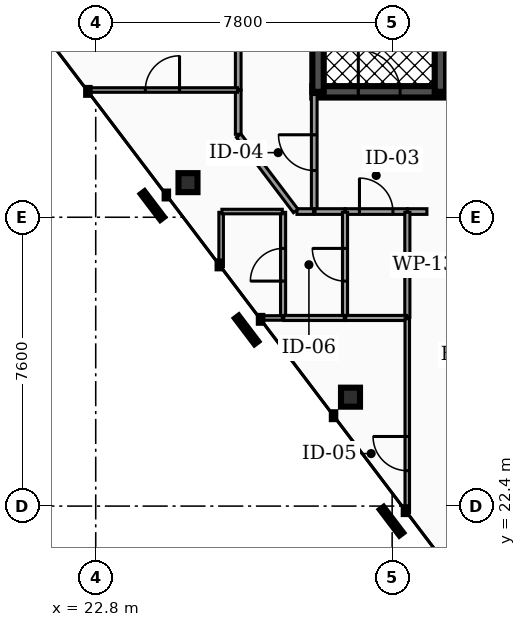
"""IFC4 building model, lengths in metres.
Left out: names, types, materials, properties, quantities, classifications, styles, units other than length and angle.
Written with IfcOpenShell. Run it as: python <this file> out.ifc"""

import sys

from ifc_helpers import new_model, si_unit, direction, frame, frame_2d, origin, origin_2d, place, context, subcontext, project, spatial, rectangle, hollow_rectangle, extrude, element, fill, save


model = new_model("IFC4")
c1 = context("Model", 3, precision=1e-05, world=origin(), true_north=direction((0.0, 1.0)))
c2 = subcontext(c1, "Body", "Model", "MODEL_VIEW")
j1 = project(units=[si_unit("LENGTHUNIT", "METRE"), si_unit("PLANEANGLEUNIT", "RADIAN")], contexts=[c1])
p1 = place(None, origin())
s1 = spatial("IfcSite", under=j1, at=p1, CompositionType="ELEMENT")
p2 = place(p1, origin())
s2 = spatial("IfcBuilding", under=s1, at=p2, CompositionType="ELEMENT")
p3 = place(p2, frame((0.0, 0.0, 261.8)))
s3 = spatial("IfcBuildingStorey", under=s2, at=p3, CompositionType="ELEMENT", Elevation=261.8)
p4 = place(p3, frame((28.5, 33.3, 0.0), z_axis=(0.0, 0.0, 1.0), x_axis=(1.0, 0.0, 0.0)))
e1 = element("IfcWall", 1, at=p4, inside=s3, PredefinedType="SHEAR", context=c2, shape_type="SweptSolid", body=[
    extrude(rectangle(XDim=19.86, YDim=0.3, at=frame_2d((9.93, 0.0))), origin(), (0.0, 0.0, 1.0), 3.18),
])
p5 = place(p4, frame((3.93, 0.0, 0.0)))
e2 = element("IfcOpeningElement", 2, at=p5, cuts=e1, PredefinedType="OPENING", context=c2, shape_type="SweptSolid", body=[
    extrude(rectangle(XDim=1.1, YDim=2.15, at=frame_2d((0.55, 1.075))), frame((0.0, 0.16, 0.0), z_axis=(0.0, -1.0, 0.0), x_axis=(1.0, 0.0, 0.0)), (0.0, 0.0, 1.0), 0.32),
])
p6 = place(p4, frame((14.77, 0.0, 0.0)))
e3 = element("IfcOpeningElement", 3, at=p6, cuts=e1, PredefinedType="OPENING", context=c2, shape_type="SweptSolid", body=[
    extrude(rectangle(XDim=1.1, YDim=2.15, at=frame_2d((0.55, 1.075))), frame((0.0, 0.16, 0.0), z_axis=(0.0, -1.0, 0.0), x_axis=(1.0, 0.0, 0.0)), (0.0, 0.0, 1.0), 0.32),
])
p7 = place(p4, frame((11.25, 0.0, 0.0)))
e4 = element("IfcOpeningElement", 4, at=p7, cuts=e1, PredefinedType="OPENING", context=c2, shape_type="SweptSolid", body=[
    extrude(rectangle(XDim=1.0, YDim=2.1, at=frame_2d((0.5, 1.05))), frame((0.0, 0.16, 0.0), z_axis=(0.0, -1.0, 0.0), x_axis=(1.0, 0.0, 0.0)), (0.0, 0.0, 1.0), 0.32),
])
p8 = place(p4, frame((12.95, 0.0, 0.0)))
e5 = element("IfcOpeningElement", 5, at=p8, cuts=e1, PredefinedType="OPENING", context=c2, shape_type="SweptSolid", body=[
    extrude(rectangle(XDim=1.0, YDim=2.1, at=frame_2d((0.5, 1.05))), frame((0.0, 0.16, 0.0), z_axis=(0.0, -1.0, 0.0), x_axis=(1.0, 0.0, 0.0)), (0.0, 0.0, 1.0), 0.32),
])
p9 = place(p4, frame((5.85, 0.0, 0.0)))
e6 = element("IfcOpeningElement", 6, at=p9, cuts=e1, PredefinedType="OPENING", context=c2, shape_type="SweptSolid", body=[
    extrude(rectangle(XDim=1.0, YDim=2.1, at=frame_2d((0.5, 1.05))), frame((0.0, 0.16, 0.0), z_axis=(0.0, -1.0, 0.0), x_axis=(1.0, 0.0, 0.0)), (0.0, 0.0, 1.0), 0.32),
])
p10 = place(p4, frame((1.21, 0.0, 0.0)))
e7 = element("IfcOpeningElement", 7, at=p10, cuts=e1, PredefinedType="OPENING", context=c2, shape_type="SweptSolid", body=[
    extrude(rectangle(XDim=1.1, YDim=2.2, at=frame_2d((0.55, 1.1))), frame((0.0, 0.16, 0.0), z_axis=(0.0, -1.0, 0.0), x_axis=(1.0, 0.0, 0.0)), (0.0, 0.0, 1.0), 0.32),
])
p11 = place(p4, frame((9.34, 0.0, 0.0)))
e8 = element("IfcOpeningElement", 8, at=p11, cuts=e1, PredefinedType="OPENING", context=c2, shape_type="SweptSolid", body=[
    extrude(rectangle(XDim=1.12, YDim=2.05, at=frame_2d((0.56, 1.025))), frame((0.0, 0.16, 0.0), z_axis=(0.0, -1.0, 0.0), x_axis=(1.0, 0.0, 0.0)), (0.0, 0.0, 1.0), 0.32),
])
p12 = place(p4, frame((17.55, 0.0, 0.0)))
e9 = element("IfcOpeningElement", 9, at=p12, cuts=e1, PredefinedType="OPENING", context=c2, shape_type="SweptSolid", body=[
    extrude(rectangle(XDim=1.1, YDim=2.2, at=frame_2d((0.55, 1.1))), frame((0.0, 0.16, 0.0), z_axis=(0.0, -1.0, 0.0), x_axis=(1.0, 0.0, 0.0)), (0.0, 0.0, 1.0), 0.32),
])
for number, where, z_axis, x_axis in (
    (10, (28.65, 33.3, 0.0), (0.0, 0.0, 1.0), (0.0, 1.0, 0.0)),
    (11, (31.87, 33.3, 0.0), (0.0, 0.0, 1.0), (0.0, 1.0, 0.0)),
):
    element("IfcWall", number, at=place(p3, frame(where, z_axis=z_axis, x_axis=x_axis)), inside=s3, PredefinedType="SHEAR", context=c2, shape_type="SweptSolid", body=[
        extrude(rectangle(XDim=10.1, YDim=0.3, at=frame_2d((5.05, 0.0))), origin(), (0.0, 0.0, 1.0), 3.18),
    ])
for number, where, z_axis, x_axis in (
    (12, (25.228, 30.91, 0.0), (0.0, 0.0, 1.0), (1.0, 0.0, 0.0)),
    (13, (29.504, 25.266, 0.0), (0.0, 0.0, 1.0), (1.0, 0.0, 0.0)),
):
    element("IfcColumn", number, at=place(p3, frame(where, z_axis=z_axis, x_axis=x_axis)), inside=s3, PredefinedType="COLUMN", context=c2, shape_type="SweptSolid", body=[
        extrude(hollow_rectangle(XDim=0.5, YDim=0.5, WallThickness=0.025, at=origin_2d()), origin(), (0.0, 0.0, 1.0), 3.18),
    ])
p13 = place(p3, frame((28.55, 30.17, 0.0), z_axis=(0.0, 0.0, 1.0), x_axis=(0.0, 1.0, 0.0)))
e14 = element("IfcWall", 14, at=p13, inside=s3, PredefinedType="PARTITIONING", context=c2, shape_type="SweptSolid", body=[
    extrude(rectangle(XDim=3.06, YDim=0.15, at=frame_2d((1.53, 0.0))), origin(), (0.0, 0.0, 1.0), 2.235),
])
p14 = place(p13, frame((1.06, 0.0, 0.0)))
e15 = element("IfcOpeningElement", 15, at=p14, cuts=e14, PredefinedType="OPENING", context=c2, shape_type="SweptSolid", body=[
    extrude(rectangle(XDim=0.94, YDim=2.05, at=frame_2d((0.47, 1.025))), frame((0.0, 0.085, 0.0), z_axis=(0.0, -1.0, 0.0), x_axis=(1.0, 0.0, 0.0)), (0.0, 0.0, 1.0), 0.17),
])
p15 = place(p3, frame((28.57, 30.15, 0.0), z_axis=(0.0, 0.0, 1.0), x_axis=(1.0, 0.0, 0.0)))
e16 = element("IfcWall", 16, at=p15, inside=s3, PredefinedType="PARTITIONING", context=c2, shape_type="SweptSolid", body=[
    extrude(rectangle(XDim=0.785, YDim=0.15, at=frame_2d((0.393, 0.0))), origin(), (0.0, 0.0, 1.0), 2.235),
])
p16 = place(p3, frame((29.365, 30.15, 0.0), z_axis=(0.0, 0.0, 1.0), x_axis=(1.0, 0.0, 0.0)))
e17 = element("IfcWall", 17, at=p16, inside=s3, PredefinedType="PARTITIONING", context=c2, shape_type="SweptSolid", body=[
    extrude(rectangle(XDim=1.63, YDim=0.15, at=frame_2d((0.815, 0.0))), origin(), (0.0, 0.0, 1.0), 2.235),
])
p17 = place(p16, frame((0.375, 0.0, 0.0)))
e18 = element("IfcOpeningElement", 18, at=p17, cuts=e17, PredefinedType="OPENING", context=c2, shape_type="SweptSolid", body=[
    extrude(rectangle(XDim=0.88, YDim=2.05, at=frame_2d((0.44, 1.025))), frame((0.0, 0.085, 0.0), z_axis=(0.0, -1.0, 0.0), x_axis=(1.0, 0.0, 0.0)), (0.0, 0.0, 1.0), 0.17),
])
p18 = place(p3, frame((31.005, 30.15, 0.0), z_axis=(0.0, 0.0, 1.0), x_axis=(1.0, 0.0, 0.0)))
e19 = element("IfcWall", 19, at=p18, inside=s3, PredefinedType="PARTITIONING", context=c2, shape_type="SweptSolid", body=[
    extrude(rectangle(XDim=0.51, YDim=0.15, at=frame_2d((0.255, 0.0))), origin(), (0.0, 0.0, 1.0), 2.235),
])
p19 = place(p3, frame((28.094, 30.15, 0.0), z_axis=(0.0, 0.0, 1.0), x_axis=(1.0, 0.0, 0.0)))
e20 = element("IfcWall", 20, at=p19, inside=s3, PredefinedType="PARTITIONING", context=c2, shape_type="SweptSolid", body=[
    extrude(rectangle(XDim=0.436, YDim=0.15, at=frame_2d((0.218, 0.0))), origin(), (0.0, 0.0, 1.0), 2.235),
])
p20 = place(p3, frame((26.55, 33.353, 0.0), z_axis=(0.0, 0.0, 1.0), x_axis=(0.0, 1.0, 0.0)))
e21 = element("IfcWall", 21, at=p20, inside=s3, PredefinedType="PARTITIONING", context=c2, shape_type="SweptSolid", body=[
    extrude(rectangle(XDim=10.197, YDim=0.15, at=frame_2d((5.099, 0.0))), origin(), (0.0, 0.0, 1.0), 2.235),
])
p21 = place(p20, frame((4.628, 0.0, 0.0)))
e22 = element("IfcOpeningElement", 22, at=p21, cuts=e21, PredefinedType="OPENING", context=c2, shape_type="SweptSolid", body=[
    extrude(rectangle(XDim=0.94, YDim=2.05, at=frame_2d((0.47, 1.025))), frame((0.0, 0.085, 0.0), z_axis=(0.0, -1.0, 0.0), x_axis=(1.0, 0.0, 0.0)), (0.0, 0.0, 1.0), 0.17),
])
p22 = place(p3, frame((26.562, 32.146, 0.0), z_axis=(0.0, 0.0, 1.0), x_axis=(0.603891739408, -0.797066350485, 0.0)))
e23 = element("IfcWall", 23, at=p22, inside=s3, PredefinedType="PARTITIONING", context=c2, shape_type="SweptSolid", body=[
    extrude(rectangle(XDim=2.485, YDim=0.15, at=frame_2d((1.242, 0.0))), origin(), (0.0, 0.0, 1.0), 2.235),
])
p23 = place(p3, frame((26.55, 32.183, 0.0), z_axis=(0.0, 0.0, 1.0), x_axis=(0.0, 1.0, 0.0)))
e24 = element("IfcWall", 24, at=p23, inside=s3, PredefinedType="PARTITIONING", context=c2, shape_type="SweptSolid", body=[
    extrude(rectangle(XDim=1.16, YDim=0.15, at=frame_2d((0.58, 0.0))), origin(), (0.0, 0.0, 1.0), 2.235),
])
p24 = place(p3, frame((29.36, 27.37, 0.0), z_axis=(0.0, 0.0, 1.0), x_axis=(0.0, 1.0, 0.0)))
e25 = element("IfcWall", 25, at=p24, inside=s3, PredefinedType="PARTITIONING", context=c2, shape_type="SweptSolid", body=[
    extrude(rectangle(XDim=2.76, YDim=0.135, at=frame_2d((1.38, 0.0))), origin(), (0.0, 0.0, 1.0), 2.235),
])
p25 = place(p24, frame((0.95, 0.0, 0.0)))
e26 = element("IfcOpeningElement", 26, at=p25, cuts=e25, PredefinedType="OPENING", context=c2, shape_type="SweptSolid", body=[
    extrude(rectangle(XDim=0.86, YDim=2.05, at=frame_2d((0.43, 1.025))), frame((0.0, 0.077, 0.0), z_axis=(0.0, -1.0, 0.0), x_axis=(1.0, 0.0, 0.0)), (0.0, 0.0, 1.0), 0.155),
])
p26 = place(p3, frame((27.73, 27.37, 0.0), z_axis=(0.0, 0.0, 1.0), x_axis=(0.0, 1.0, 0.0)))
e27 = element("IfcWall", 27, at=p26, inside=s3, PredefinedType="PARTITIONING", context=c2, shape_type="SweptSolid", body=[
    extrude(rectangle(XDim=2.76, YDim=0.135, at=frame_2d((1.38, 0.0))), origin(), (0.0, 0.0, 1.0), 2.235),
])
p27 = place(p26, frame((0.95, 0.0, 0.0)))
e28 = element("IfcOpeningElement", 28, at=p27, cuts=e27, PredefinedType="OPENING", context=c2, shape_type="SweptSolid", body=[
    extrude(rectangle(XDim=0.86, YDim=2.05, at=frame_2d((0.43, 1.025))), frame((0.0, 0.077, 0.0), z_axis=(0.0, -1.0, 0.0), x_axis=(1.0, 0.0, 0.0)), (0.0, 0.0, 1.0), 0.155),
])
p28 = place(p3, frame((27.75, 27.35, 0.0), z_axis=(0.0, 0.0, 1.0), x_axis=(1.0, 0.0, 0.0)))
e29 = element("IfcWall", 29, at=p28, inside=s3, PredefinedType="PARTITIONING", context=c2, shape_type="SweptSolid", body=[
    extrude(rectangle(XDim=1.59, YDim=0.135, at=frame_2d((0.795, 0.0))), origin(), (0.0, 0.0, 1.0), 2.235),
])
p29 = place(p3, frame((31.0, 27.37, 0.0), z_axis=(0.0, 0.0, 1.0), x_axis=(0.0, 1.0, 0.0)))
e30 = element("IfcWall", 30, at=p29, inside=s3, PredefinedType="PARTITIONING", context=c2, shape_type="SweptSolid", body=[
    extrude(rectangle(XDim=2.76, YDim=0.135, at=frame_2d((1.38, 0.0))), origin(), (0.0, 0.0, 1.0), 2.235),
])
p30 = place(p3, frame((29.38, 27.35, 0.0), z_axis=(0.0, 0.0, 1.0), x_axis=(1.0, 0.0, 0.0)))
e31 = element("IfcWall", 31, at=p30, inside=s3, PredefinedType="PARTITIONING", context=c2, shape_type="SweptSolid", body=[
    extrude(rectangle(XDim=1.6, YDim=0.135, at=frame_2d((0.8, 0.0))), origin(), (0.0, 0.0, 1.0), 2.235),
])
p31 = place(p3, frame((27.125, 27.35, 0.0), z_axis=(0.0, 0.0, 1.0), x_axis=(1.0, 0.0, 0.0)))
e32 = element("IfcWall", 32, at=p31, inside=s3, PredefinedType="PARTITIONING", context=c2, shape_type="SweptSolid", body=[
    extrude(rectangle(XDim=0.585, YDim=0.12, at=frame_2d((0.293, 0.0))), origin(), (0.0, 0.0, 1.0), 2.235),
])
p32 = place(p3, frame((26.1, 28.698, 0.0), z_axis=(0.0, 0.0, 1.0), x_axis=(0.0, 1.0, 0.0)))
e33 = element("IfcWall", 33, at=p32, inside=s3, PredefinedType="PARTITIONING", context=c2, shape_type="SweptSolid", body=[
    extrude(rectangle(XDim=1.432, YDim=0.12, at=frame_2d((0.716, 0.0))), origin(), (0.0, 0.0, 1.0), 2.235),
])
p33 = place(p3, frame((26.12, 30.15, 0.0), z_axis=(0.0, 0.0, 1.0), x_axis=(1.0, 0.0, 0.0)))
e34 = element("IfcWall", 34, at=p33, inside=s3, PredefinedType="PARTITIONING", context=c2, shape_type="SweptSolid", body=[
    extrude(rectangle(XDim=1.59, YDim=0.12, at=frame_2d((0.795, 0.0))), origin(), (0.0, 0.0, 1.0), 2.235),
])
p34 = place(p3, frame((30.998, 22.232, 0.0), z_axis=(0.0, 0.0, 1.0), x_axis=(0.0, 1.0, 0.0)))
e35 = element("IfcWall", 35, at=p34, inside=s3, PredefinedType="PARTITIONING", context=c2, shape_type="SweptSolid", body=[
    extrude(rectangle(XDim=5.098, YDim=0.12, at=frame_2d((2.549, 0.0))), origin(), (0.0, 0.0, 1.0), 2.235),
])
p35 = place(p34, frame((1.099, 0.0, 0.0)))
e36 = element("IfcOpeningElement", 36, at=p35, cuts=e35, PredefinedType="OPENING", context=c2, shape_type="SweptSolid", body=[
    extrude(rectangle(XDim=0.9, YDim=2.05, at=frame_2d((0.45, 1.025))), frame((0.0, 0.07, 0.0), z_axis=(0.0, -1.0, 0.0), x_axis=(1.0, 0.0, 0.0)), (0.0, 0.0, 1.0), 0.14),
])
p36 = place(p3, frame((22.581, 33.348, 0.0), z_axis=(0.0, 0.0, 1.0), x_axis=(1.0, 0.0, 0.0)))
e37 = element("IfcWall", 37, at=p36, inside=s3, PredefinedType="PARTITIONING", context=c2, shape_type="SweptSolid", body=[
    extrude(rectangle(XDim=3.949, YDim=0.12, at=frame_2d((1.975, 0.0))), origin(), (0.0, 0.0, 1.0), 2.235),
])
p37 = place(p36, frame((1.525, 0.0, 0.0)))
e38 = element("IfcOpeningElement", 38, at=p37, cuts=e37, PredefinedType="OPENING", context=c2, shape_type="SweptSolid", body=[
    extrude(rectangle(XDim=0.9, YDim=2.05, at=frame_2d((0.45, 1.025))), frame((0.0, 0.07, 0.0), z_axis=(0.0, -1.0, 0.0), x_axis=(1.0, 0.0, 0.0)), (0.0, 0.0, 1.0), 0.14),
])
p38 = place(p10, origin())
e39 = element("IfcDoor", 39, at=p38, inside=s3, OperationType="SINGLE_SWING_LEFT", PredefinedType="DOOR", context=c2, shape_type="SweptSolid", body=[
    extrude(rectangle(XDim=1.1, YDim=2.2, at=frame_2d((0.55, 1.1))), frame((0.0, 0.025, 0.0), z_axis=(0.0, -1.0, 0.0), x_axis=(1.0, 0.0, 0.0)), (0.0, 0.0, 1.0), 0.05),
])
fill(e7, e39)
p39 = place(p14, origin())
e40 = element("IfcDoor", 40, at=p39, inside=s3, OperationType="SINGLE_SWING_RIGHT", PredefinedType="DOOR", context=c2, shape_type="SweptSolid", body=[
    extrude(rectangle(XDim=0.94, YDim=2.05, at=frame_2d((0.47, 1.025))), frame((0.0, 0.025, 0.0), z_axis=(0.0, -1.0, 0.0), x_axis=(1.0, 0.0, 0.0)), (0.0, 0.0, 1.0), 0.05),
])
fill(e15, e40)
p40 = place(p17, origin())
e41 = element("IfcDoor", 41, at=p40, inside=s3, OperationType="SINGLE_SWING_LEFT", PredefinedType="DOOR", context=c2, shape_type="SweptSolid", body=[
    extrude(rectangle(XDim=0.88, YDim=2.05, at=frame_2d((0.44, 1.025))), frame((0.0, 0.025, 0.0), z_axis=(0.0, -1.0, 0.0), x_axis=(1.0, 0.0, 0.0)), (0.0, 0.0, 1.0), 0.05),
])
fill(e18, e41)
p41 = place(p25, origin())
e42 = element("IfcDoor", 42, at=p41, inside=s3, OperationType="SINGLE_SWING_RIGHT", PredefinedType="DOOR", context=c2, shape_type="SweptSolid", body=[
    extrude(rectangle(XDim=0.86, YDim=2.05, at=frame_2d((0.43, 1.025))), frame((0.0, 0.025, 0.0), z_axis=(0.0, -1.0, 0.0), x_axis=(1.0, 0.0, 0.0)), (0.0, 0.0, 1.0), 0.05),
])
fill(e26, e42)
p42 = place(p27, origin())
e43 = element("IfcDoor", 43, at=p42, inside=s3, OperationType="SINGLE_SWING_LEFT", PredefinedType="DOOR", context=c2, shape_type="SweptSolid", body=[
    extrude(rectangle(XDim=0.86, YDim=2.05, at=frame_2d((0.43, 1.025))), frame((0.0, 0.025, 0.0), z_axis=(0.0, -1.0, 0.0), x_axis=(1.0, 0.0, 0.0)), (0.0, 0.0, 1.0), 0.05),
])
fill(e28, e43)
p43 = place(p35, origin())
e44 = element("IfcDoor", 44, at=p43, inside=s3, OperationType="SINGLE_SWING_RIGHT", PredefinedType="DOOR", context=c2, shape_type="SweptSolid", body=[
    extrude(rectangle(XDim=0.9, YDim=2.05, at=frame_2d((0.45, 1.025))), frame((0.0, 0.025, 0.0), z_axis=(0.0, -1.0, 0.0), x_axis=(1.0, 0.0, 0.0)), (0.0, 0.0, 1.0), 0.05),
])
fill(e36, e44)
p44 = place(p37, origin())
e45 = element("IfcDoor", 45, at=p44, inside=s3, OperationType="SINGLE_SWING_RIGHT", PredefinedType="DOOR", context=c2, shape_type="SweptSolid", body=[
    extrude(rectangle(XDim=0.9, YDim=2.05, at=frame_2d((0.45, 1.025))), frame((0.0, 0.025, 0.0), z_axis=(0.0, -1.0, 0.0), x_axis=(1.0, 0.0, 0.0)), (0.0, 0.0, 1.0), 0.05),
])
fill(e38, e45)
save(model, sys.argv[1])
